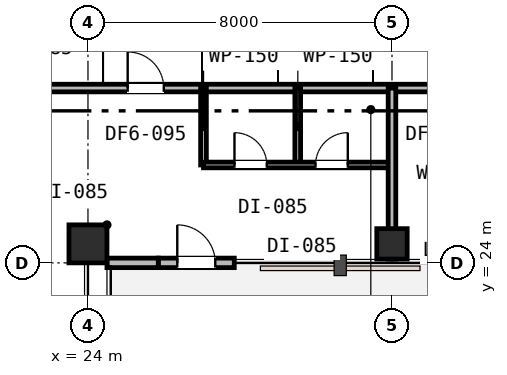
"""IFC4 building model, lengths in metres.
Left out: names, types, materials, properties, quantities, classifications, styles, units other than length and angle.
Written with IfcOpenShell. Run it as: python <this file> out.ifc"""

import sys

from ifc_helpers import new_model, si_unit, direction, frame, frame_2d, origin, origin_2d, place, context, subcontext, project, spatial, rectangle, extrude, element, fill, save


model = new_model("IFC4")
c1 = context("Model", 3, precision=1e-05, world=origin(), true_north=direction((0.0, 1.0)))
c2 = subcontext(c1, "Body", "Model", "MODEL_VIEW")
j1 = project(units=[si_unit("LENGTHUNIT", "METRE"), si_unit("PLANEANGLEUNIT", "RADIAN")], contexts=[c1])
p1 = place(None, origin())
s1 = spatial("IfcSite", under=j1, at=p1, CompositionType="ELEMENT")
p2 = place(p1, origin())
s2 = spatial("IfcBuilding", under=s1, at=p2, CompositionType="ELEMENT")
p3 = place(p2, frame((0.0, 0.0, 154.2)))
s3 = spatial("IfcBuildingStorey", under=s2, at=p3, CompositionType="ELEMENT", Elevation=154.2)
p4 = place(p3, frame((24.0, 24.5, 0.0), z_axis=(0.0, 0.0, 1.0), x_axis=(1.0, 0.0, 0.0)))
e1 = element("IfcColumn", 1, at=p4, inside=s3, PredefinedType="COLUMN", context=c2, shape_type="SweptSolid", body=[
    extrude(rectangle(XDim=1.0, YDim=1.0, at=origin_2d()), origin(), (0.0, 0.0, 1.0), 3.6),
])
p5 = place(p3, frame((32.0, 24.5, 0.0), z_axis=(0.0, 0.0, 1.0), x_axis=(1.0, 0.0, 0.0)))
e2 = element("IfcColumn", 2, at=p5, inside=s3, PredefinedType="COLUMN", context=c2, shape_type="SweptSolid", body=[
    extrude(rectangle(XDim=0.8, YDim=0.8, at=origin_2d()), origin(), (0.0, 0.0, 1.0), 3.6),
])
p6 = place(p3, frame((25.85, 24.0, 0.0), z_axis=(0.0, 0.0, 1.0), x_axis=(1.0, 0.0, 0.0)))
e3 = element("IfcWall", 3, at=p6, inside=s3, PredefinedType="STANDARD", context=c2, shape_type="SweptSolid", body=[
    extrude(rectangle(XDim=2.0, YDim=0.25, at=frame_2d((1.0, 0.0))), origin(), (0.0, 0.0, 1.0), 3.01),
])
p7 = place(p6, frame((0.5, 0.0, 0.0)))
e4 = element("IfcOpeningElement", 4, at=p7, cuts=e3, PredefinedType="OPENING", context=c2, shape_type="SweptSolid", body=[
    extrude(rectangle(XDim=1.0, YDim=2.15, at=frame_2d((0.5, 1.075))), frame((0.0, 0.135, 0.0), z_axis=(0.0, -1.0, 0.0), x_axis=(1.0, 0.0, 0.0)), (0.0, 0.0, 1.0), 0.27),
])
p8 = place(p3, frame((24.5, 24.0, 0.0), z_axis=(0.0, 0.0, 1.0), x_axis=(1.0, 0.0, 0.0)))
e5 = element("IfcWall", 5, at=p8, inside=s3, PredefinedType="STANDARD", context=c2, shape_type="SweptSolid", body=[
    extrude(rectangle(XDim=1.35, YDim=0.25, at=frame_2d((0.675, 0.0))), origin(), (0.0, 0.0, 1.0), 3.01),
])
p9 = place(p3, frame((19.6, 28.6, 0.0), z_axis=(0.0, 0.0, 1.0), x_axis=(1.0, 0.0, 0.0)))
e6 = element("IfcWall", 6, at=p9, inside=s3, PredefinedType="PARTITIONING", context=c2, shape_type="SweptSolid", body=[
    extrude(rectangle(XDim=31.3, YDim=0.2, at=frame_2d((15.65, 0.0))), origin(), (0.0, 0.0, 1.0), 2.93),
])
p10 = place(p9, frame((5.445, 0.0, 0.0)))
e7 = element("IfcOpeningElement", 7, at=p10, cuts=e6, PredefinedType="OPENING", context=c2, shape_type="SweptSolid", body=[
    extrude(rectangle(XDim=0.95, YDim=2.15, at=frame_2d((0.475, 1.075))), frame((0.0, 0.11, 0.0), z_axis=(0.0, -1.0, 0.0), x_axis=(1.0, 0.0, 0.0)), (0.0, 0.0, 1.0), 0.22),
])
p11 = place(p9, frame((13.35, 0.0, 0.0)))
e8 = element("IfcOpeningElement", 8, at=p11, cuts=e6, PredefinedType="OPENING", context=c2, shape_type="SweptSolid", body=[
    extrude(rectangle(XDim=0.95, YDim=2.15, at=frame_2d((0.475, 1.075))), frame((0.0, 0.11, 0.0), z_axis=(0.0, -1.0, 0.0), x_axis=(1.0, 0.0, 0.0)), (0.0, 0.0, 1.0), 0.22),
])
p12 = place(p9, frame((21.925, 0.0, 0.0)))
e9 = element("IfcOpeningElement", 9, at=p12, cuts=e6, PredefinedType="OPENING", context=c2, shape_type="SweptSolid", body=[
    extrude(rectangle(XDim=0.95, YDim=2.15, at=frame_2d((0.475, 1.075))), frame((0.0, 0.11, 0.0), z_axis=(0.0, -1.0, 0.0), x_axis=(1.0, 0.0, 0.0)), (0.0, 0.0, 1.0), 0.22),
])
for number, where, z_axis, x_axis in (
    (10, (27.04, 26.576, 0.0), (0.0, 0.0, 1.0), (0.0, 1.0, 0.0)),
    (11, (29.52, 26.576, 0.0), (0.0, 0.0, 1.0), (0.0, 1.0, 0.0)),
):
    element("IfcWall", number, at=place(p3, frame(where, z_axis=z_axis, x_axis=x_axis)), inside=s3, PredefinedType="PARTITIONING", context=c2, shape_type="SweptSolid", body=[
        extrude(rectangle(XDim=2.024, YDim=0.15, at=frame_2d((1.012, 0.0))), origin(), (0.0, 0.0, 1.0), 2.96),
    ])
p13 = place(p3, frame((27.04, 26.576, 0.0), z_axis=(0.0, 0.0, 1.0), x_axis=(1.0, 0.0, 0.0)))
e12 = element("IfcWall", 12, at=p13, inside=s3, PredefinedType="PARTITIONING", context=c2, shape_type="SweptSolid", body=[
    extrude(rectangle(XDim=4.96, YDim=0.15, at=frame_2d((2.48, 0.0))), origin(), (0.0, 0.0, 1.0), 2.93),
])
p14 = place(p13, frame((0.815, 0.0, 0.0)))
e13 = element("IfcOpeningElement", 13, at=p14, cuts=e12, PredefinedType="OPENING", context=c2, shape_type="SweptSolid", body=[
    extrude(rectangle(XDim=0.85, YDim=2.15, at=frame_2d((0.425, 1.075))), frame((0.0, 0.085, 0.0), z_axis=(0.0, -1.0, 0.0), x_axis=(1.0, 0.0, 0.0)), (0.0, 0.0, 1.0), 0.17),
])
p15 = place(p13, frame((2.947, 0.0, 0.0)))
e14 = element("IfcOpeningElement", 14, at=p15, cuts=e12, PredefinedType="OPENING", context=c2, shape_type="SweptSolid", body=[
    extrude(rectangle(XDim=0.85, YDim=2.15, at=frame_2d((0.425, 1.075))), frame((0.0, 0.085, 0.0), z_axis=(0.0, -1.0, 0.0), x_axis=(1.0, 0.0, 0.0)), (0.0, 0.0, 1.0), 0.17),
])
p16 = place(p3, frame((32.0, 24.1, 0.0), z_axis=(0.0, 0.0, 1.0), x_axis=(0.0, 1.0, 0.0)))
e15 = element("IfcWall", 15, at=p16, inside=s3, PredefinedType="PARTITIONING", context=c2, shape_type="SweptSolid", body=[
    extrude(rectangle(XDim=4.5, YDim=0.2, at=frame_2d((2.25, 0.0))), origin(), (0.0, 0.0, 1.0), 2.93),
])
p17 = place(p7, origin())
e16 = element("IfcDoor", 16, at=p17, inside=s3, OperationType="SINGLE_SWING_LEFT", PredefinedType="DOOR", context=c2, shape_type="SweptSolid", body=[
    extrude(rectangle(XDim=1.0, YDim=2.15, at=frame_2d((0.5, 1.075))), frame((0.0, 0.025, 0.0), z_axis=(0.0, -1.0, 0.0), x_axis=(1.0, 0.0, 0.0)), (0.0, 0.0, 1.0), 0.05),
])
fill(e4, e16)
p18 = place(p10, origin())
e17 = element("IfcDoor", 17, at=p18, inside=s3, OperationType="SINGLE_SWING_LEFT", PredefinedType="DOOR", context=c2, shape_type="SweptSolid", body=[
    extrude(rectangle(XDim=0.95, YDim=2.15, at=frame_2d((0.475, 1.075))), frame((0.0, 0.025, 0.0), z_axis=(0.0, -1.0, 0.0), x_axis=(1.0, 0.0, 0.0)), (0.0, 0.0, 1.0), 0.05),
])
fill(e7, e17)
p19 = place(p14, origin())
e18 = element("IfcDoor", 18, at=p19, inside=s3, OperationType="SINGLE_SWING_LEFT", PredefinedType="DOOR", context=c2, shape_type="SweptSolid", body=[
    extrude(rectangle(XDim=0.85, YDim=2.15, at=frame_2d((0.425, 1.075))), frame((0.0, 0.025, 0.0), z_axis=(0.0, -1.0, 0.0), x_axis=(1.0, 0.0, 0.0)), (0.0, 0.0, 1.0), 0.05),
])
fill(e13, e18)
p20 = place(p15, origin())
e19 = element("IfcDoor", 19, at=p20, inside=s3, OperationType="SINGLE_SWING_RIGHT", PredefinedType="DOOR", context=c2, shape_type="SweptSolid", body=[
    extrude(rectangle(XDim=0.85, YDim=2.15, at=frame_2d((0.425, 1.075))), frame((0.0, 0.025, 0.0), z_axis=(0.0, -1.0, 0.0), x_axis=(1.0, 0.0, 0.0)), (0.0, 0.0, 1.0), 0.05),
])
fill(e14, e19)
save(model, sys.argv[1])
